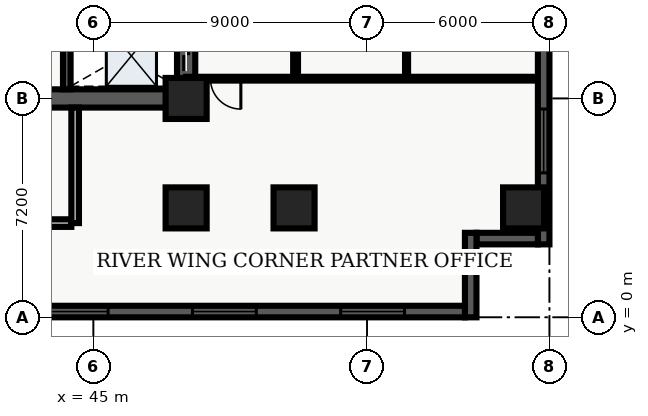
"""IFC4 building model, lengths in metres.
Left out: names, types, materials, properties, quantities, classifications, styles, units other than length and angle.
Written with IfcOpenShell. Run it as: python <this file> out.ifc"""

import sys

from ifc_helpers import new_model, entity, si_unit, converted_unit, direction, frame, origin_with_axes, origin_2d_with_axis, place, context, subcontext, project, spatial, polyline, rectangle, outline, extrude, element, fill, save


model = new_model("IFC4")
c1 = context("Model", 3, precision=1e-05, world=origin_with_axes(), true_north=direction((0.0, 1.0)))
c2 = subcontext(c1, "Body", "Model", "MODEL_VIEW")
j1 = project(units=[si_unit("LENGTHUNIT", "METRE"), converted_unit("PLANEANGLEUNIT", "DEGREE", entity("IfcPlaneAngleMeasure", 0.017), si_unit("PLANEANGLEUNIT", "RADIAN"), dimensions=[0, 0, 0, 0, 0, 0, 0])], contexts=[c1])
p1 = place(None, origin_with_axes())
s1 = spatial("IfcSite", under=j1, at=p1, CompositionType="ELEMENT")
p2 = place(p1, origin_with_axes())
s2 = spatial("IfcBuilding", under=s1, at=p2, CompositionType="ELEMENT")
p3 = place(p2, frame((0.0, 0.0, 48.3), z_axis=(0.0, 0.0, 1.0), x_axis=(1.0, 0.0, 0.0)))
s3 = spatial("IfcBuildingStorey", under=s2, at=p3, CompositionType="ELEMENT", Elevation=48.3)
p4 = place(p3, frame((40.2, 7.2, 0.0), z_axis=(0.0, 0.0, 1.0), x_axis=(1.0, 0.0, 0.0)))
e1 = element("IfcWall", 1, at=p4, inside=s3, PredefinedType="SHEAR", context=c2, shape_type="SweptSolid", body=[
    extrude(outline(polyline([(0.0, -0.3), (7.85, -0.3), (7.85, 0.3), (0.0, 0.3), (0.0, -0.3)])), origin_with_axes(), (0.0, 0.0, 1.0), 3.66),
])
p5 = place(p4, frame((2.175, 0.0, 0.0), z_axis=(0.0, 0.0, 1.0), x_axis=(1.0, 0.0, 0.0)))
e2 = element("IfcOpeningElement", 2, at=p5, cuts=e1, PredefinedType="OPENING", context=c2, shape_type="SweptSolid", body=[
    extrude(rectangle(XDim=1.05, YDim=0.62, at=origin_2d_with_axis()), origin_with_axes(), (0.0, 0.0, 1.0), 2.15),
])
p6 = place(p3, frame((48.05, 7.2, 0.0), z_axis=(0.0, 0.0, 1.0), x_axis=(0.0, 1.0, 0.0)))
e3 = element("IfcWall", 3, at=p6, inside=s3, PredefinedType="SHEAR", context=c2, shape_type="SweptSolid", body=[
    extrude(outline(polyline([(0.0, -0.3), (15.6, -0.3), (15.6, 0.3), (0.0, 0.3), (0.0, -0.3)])), origin_with_axes(), (0.0, 0.0, 1.0), 3.66),
])
p7 = place(p6, frame((1.425, 0.0, 0.0), z_axis=(0.0, 0.0, 1.0), x_axis=(1.0, 0.0, 0.0)))
e4 = element("IfcOpeningElement", 4, at=p7, cuts=e3, PredefinedType="OPENING", context=c2, shape_type="SweptSolid", body=[
    extrude(rectangle(XDim=1.05, YDim=0.62, at=origin_2d_with_axis()), origin_with_axes(), (0.0, 0.0, 1.0), 2.15),
])
p8 = place(p6, frame((3.475, 0.0, 0.0), z_axis=(0.0, 0.0, 1.0), x_axis=(1.0, 0.0, 0.0)))
e5 = element("IfcOpeningElement", 5, at=p8, cuts=e3, PredefinedType="OPENING", context=c2, shape_type="SweptSolid", body=[
    extrude(rectangle(XDim=1.05, YDim=0.62, at=origin_2d_with_axis()), origin_with_axes(), (0.0, 0.0, 1.0), 2.15),
])
p9 = place(p6, frame((5.625, 0.0, 0.0), z_axis=(0.0, 0.0, 1.0), x_axis=(1.0, 0.0, 0.0)))
e6 = element("IfcOpeningElement", 6, at=p9, cuts=e3, PredefinedType="OPENING", context=c2, shape_type="SweptSolid", body=[
    extrude(rectangle(XDim=0.95, YDim=0.62, at=origin_2d_with_axis()), origin_with_axes(), (0.0, 0.0, 1.0), 2.15),
])
p10 = place(p3, frame((44.125, 7.5, 0.0), z_axis=(0.0, 0.0, 1.0), x_axis=(0.0, 1.0, 0.0)))
e7 = element("IfcWall", 7, at=p10, inside=s3, PredefinedType="SHEAR", context=c2, shape_type="SweptSolid", body=[
    extrude(outline(polyline([(0.0, -0.125), (15.0, -0.125), (15.0, 0.125), (0.0, 0.125), (0.0, -0.125)])), origin_with_axes(), (0.0, 0.0, 1.0), 3.66),
])
p11 = place(p3, frame((40.325, 3.1, 0.0), z_axis=(0.0, 0.0, 1.0), x_axis=(1.0, 0.0, 0.0)))
e8 = element("IfcWall", 8, at=p11, inside=s3, PredefinedType="SOLIDWALL", context=c2, shape_type="SweptSolid", body=[
    extrude(outline(polyline([(0.0, -0.125), (3.95, -0.125), (3.95, 0.125), (0.0, 0.125), (0.0, -0.125)])), origin_with_axes(), (0.0, 0.0, 1.0), 2.7),
])
p12 = place(p3, frame((44.4, 3.1, 0.0), z_axis=(0.0, 0.0, 1.0), x_axis=(0.0, 1.0, 0.0)))
e9 = element("IfcWall", 9, at=p12, inside=s3, PredefinedType="SOLIDWALL", context=c2, shape_type="SweptSolid", body=[
    extrude(outline(polyline([(0.0, -0.125), (3.8, -0.125), (3.8, 0.125), (0.0, 0.125), (0.0, -0.125)])), origin_with_axes(), (0.0, 0.0, 1.0), 2.7),
])
for number, where, z_axis, x_axis in (
    (10, (48.05, 3.6, 0.0), (0.0, 0.0, 1.0), (1.0, 0.0, 0.0)),
    (11, (48.05, 7.2, 0.0), (0.0, 0.0, 1.0), (1.0, 0.0, 0.0)),
    (12, (51.6, 3.6, 0.0), (0.0, 0.0, 1.0), (1.0, 0.0, 0.0)),
    (13, (59.15, 3.6, 0.0), (0.0, 0.0, 1.0), (1.0, 0.0, 0.0)),
):
    element("IfcColumn", number, at=place(p3, frame(where, z_axis=z_axis, x_axis=x_axis)), inside=s3, PredefinedType="COLUMN", context=c2, shape_type="SweptSolid", body=[
        extrude(rectangle(XDim=1.35, YDim=1.35, at=origin_2d_with_axis()), origin_with_axes(), (0.0, 0.0, 1.0), 3.9),
    ])
p13 = place(p3, frame((51.65, 7.85, 0.0), z_axis=(0.0, 0.0, 1.0), x_axis=(0.0, 1.0, 0.0)))
e14 = element("IfcWall", 14, at=p13, inside=s3, PredefinedType="PARTITIONING", context=c2, shape_type="SweptSolid", body=[
    extrude(outline(polyline([(0.0, -0.08), (18.8, -0.08), (18.8, 0.08), (0.0, 0.08), (0.0, -0.08)])), origin_with_axes(), (0.0, 0.0, 1.0), 2.7),
])
p14 = place(p13, frame((4.453, 0.0, 0.0), z_axis=(0.0, 0.0, 1.0), x_axis=(1.0, 0.0, 0.0)))
e15 = element("IfcOpeningElement", 15, at=p14, cuts=e14, PredefinedType="OPENING", context=c2, shape_type="SweptSolid", body=[
    extrude(rectangle(XDim=1.0, YDim=0.18, at=origin_2d_with_axis()), origin_with_axes(), (0.0, 0.0, 1.0), 2.15),
])
p15 = place(p13, frame((7.831, 0.0, 0.0), z_axis=(0.0, 0.0, 1.0), x_axis=(1.0, 0.0, 0.0)))
e16 = element("IfcOpeningElement", 16, at=p15, cuts=e14, PredefinedType="OPENING", context=c2, shape_type="SweptSolid", body=[
    extrude(rectangle(XDim=1.0, YDim=0.18, at=origin_2d_with_axis()), origin_with_axes(), (0.0, 0.0, 1.0), 2.15),
])
p16 = place(p13, frame((11.898, 0.0, 0.0), z_axis=(0.0, 0.0, 1.0), x_axis=(1.0, 0.0, 0.0)))
e17 = element("IfcOpeningElement", 17, at=p16, cuts=e14, PredefinedType="OPENING", context=c2, shape_type="SweptSolid", body=[
    extrude(rectangle(XDim=1.0, YDim=0.18, at=origin_2d_with_axis()), origin_with_axes(), (0.0, 0.0, 1.0), 2.15),
])
p17 = place(p13, frame((17.98, 0.0, 0.0), z_axis=(0.0, 0.0, 1.0), x_axis=(1.0, 0.0, 0.0)))
e18 = element("IfcOpeningElement", 18, at=p17, cuts=e14, PredefinedType="OPENING", context=c2, shape_type="SweptSolid", body=[
    extrude(rectangle(XDim=1.0, YDim=0.18, at=origin_2d_with_axis()), origin_with_axes(), (0.0, 0.0, 1.0), 2.15),
])
p18 = place(p3, frame((59.64, 7.85, 0.0), z_axis=(0.0, 0.0, 1.0), x_axis=(-1.0, 0.0, 0.0)))
e19 = element("IfcWall", 19, at=p18, inside=s3, PredefinedType="PARTITIONING", context=c2, shape_type="SweptSolid", body=[
    extrude(outline(polyline([(0.0, -0.062), (11.59, -0.062), (11.59, 0.062), (0.0, 0.062), (0.0, -0.062)])), origin_with_axes(), (0.0, 0.0, 1.0), 2.7),
])
p19 = place(p18, frame((10.29, 0.0, 0.0), z_axis=(0.0, 0.0, 1.0), x_axis=(1.0, 0.0, 0.0)))
e20 = element("IfcOpeningElement", 20, at=p19, cuts=e19, PredefinedType="OPENING", context=c2, shape_type="SweptSolid", body=[
    extrude(rectangle(XDim=1.0, YDim=0.145, at=origin_2d_with_axis()), origin_with_axes(), (0.0, 0.0, 1.0), 2.15),
])
p20 = place(p3, frame((55.3, 7.98, 0.0), z_axis=(0.0, 0.0, 1.0), x_axis=(0.0, 1.0, 0.0)))
e21 = element("IfcWall", 21, at=p20, inside=s3, PredefinedType="PARTITIONING", context=c2, shape_type="SweptSolid", body=[
    extrude(outline(polyline([(0.0, -0.05), (18.54, -0.05), (18.54, 0.05), (0.0, 0.05), (0.0, -0.05)])), origin_with_axes(), (0.0, 0.0, 1.0), 2.7),
])
p21 = place(p20, frame((3.073, 0.0, 0.0), z_axis=(0.0, 0.0, 1.0), x_axis=(1.0, 0.0, 0.0)))
e22 = element("IfcOpeningElement", 22, at=p21, cuts=e21, PredefinedType="OPENING", context=c2, shape_type="SweptSolid", body=[
    extrude(rectangle(XDim=0.95, YDim=0.12, at=origin_2d_with_axis()), origin_with_axes(), (0.0, 0.0, 1.0), 2.15),
])
p22 = place(p20, frame((7.981, 0.0, 0.0), z_axis=(0.0, 0.0, 1.0), x_axis=(1.0, 0.0, 0.0)))
e23 = element("IfcOpeningElement", 23, at=p22, cuts=e21, PredefinedType="OPENING", context=c2, shape_type="SweptSolid", body=[
    extrude(rectangle(XDim=0.95, YDim=0.12, at=origin_2d_with_axis()), origin_with_axes(), (0.0, 0.0, 1.0), 2.15),
])
p23 = place(p20, frame((11.768, 0.0, 0.0), z_axis=(0.0, 0.0, 1.0), x_axis=(1.0, 0.0, 0.0)))
e24 = element("IfcOpeningElement", 24, at=p23, cuts=e21, PredefinedType="OPENING", context=c2, shape_type="SweptSolid", body=[
    extrude(rectangle(XDim=0.95, YDim=0.12, at=origin_2d_with_axis()), origin_with_axes(), (0.0, 0.0, 1.0), 2.15),
])
p24 = place(p20, frame((16.201, 0.0, 0.0), z_axis=(0.0, 0.0, 1.0), x_axis=(1.0, 0.0, 0.0)))
e25 = element("IfcOpeningElement", 25, at=p24, cuts=e21, PredefinedType="OPENING", context=c2, shape_type="SweptSolid", body=[
    extrude(rectangle(XDim=0.95, YDim=0.12, at=origin_2d_with_axis()), origin_with_axes(), (0.0, 0.0, 1.0), 2.15),
])
p25 = place(p3, frame((59.81, 26.02, 0.0), z_axis=(0.0, 0.0, 1.0), x_axis=(0.0, -1.0, 0.0)))
e26 = element("IfcWall", 26, at=p25, inside=s3, PredefinedType="SOLIDWALL", context=c2, shape_type="SweptSolid", body=[
    extrude(outline(polyline([(0.0, -0.19), (23.62, -0.19), (23.62, 0.19), (0.0, 0.19), (0.0, -0.19)])), origin_with_axes(), (0.0, 0.0, 1.0), 3.66),
])
p26 = place(p25, frame((20.218, 0.0, 0.45), z_axis=(0.0, 0.0, 1.0), x_axis=(1.0, 0.0, 0.0)))
e27 = element("IfcOpeningElement", 27, at=p26, cuts=e26, PredefinedType="OPENING", context=c2, shape_type="SweptSolid", body=[
    extrude(rectangle(XDim=2.1, YDim=0.4, at=origin_2d_with_axis()), origin_with_axes(), (0.0, 0.0, 1.0), 2.2),
])
p27 = place(p3, frame((59.62, 2.59, 0.0), z_axis=(0.0, 0.0, 1.0), x_axis=(-1.0, 0.0, 0.0)))
e28 = element("IfcWall", 28, at=p27, inside=s3, PredefinedType="SOLIDWALL", context=c2, shape_type="SweptSolid", body=[
    extrude(outline(polyline([(0.0, -0.19), (2.02, -0.19), (2.02, 0.19), (0.0, 0.19), (0.0, -0.19)])), origin_with_axes(), (0.0, 0.0, 1.0), 3.66),
])
p28 = place(p3, frame((57.41, 2.78, 0.0), z_axis=(0.0, 0.0, 1.0), x_axis=(0.0, -1.0, 0.0)))
e29 = element("IfcWall", 29, at=p28, inside=s3, PredefinedType="SOLIDWALL", context=c2, shape_type="SweptSolid", body=[
    extrude(outline(polyline([(0.0, -0.19), (2.78, -0.19), (2.78, 0.19), (0.0, 0.19), (0.0, -0.19)])), origin_with_axes(), (0.0, 0.0, 1.0), 3.66),
])
p29 = place(p3, frame((57.22, 0.19, 0.0), z_axis=(0.0, 0.0, 1.0), x_axis=(-1.0, 0.0, 0.0)))
e30 = element("IfcWall", 30, at=p29, inside=s3, PredefinedType="SOLIDWALL", context=c2, shape_type="SweptSolid", body=[
    extrude(outline(polyline([(0.0, -0.19), (54.82, -0.19), (54.82, 0.19), (0.0, 0.19), (0.0, -0.19)])), origin_with_axes(), (0.0, 0.0, 1.0), 3.66),
])
p30 = place(p29, frame((3.037, 0.0, 0.45), z_axis=(0.0, 0.0, 1.0), x_axis=(1.0, 0.0, 0.0)))
e31 = element("IfcOpeningElement", 31, at=p30, cuts=e30, PredefinedType="OPENING", context=c2, shape_type="SweptSolid", body=[
    extrude(rectangle(XDim=2.1, YDim=0.4, at=origin_2d_with_axis()), origin_with_axes(), (0.0, 0.0, 1.0), 2.2),
])
p31 = place(p29, frame((7.912, 0.0, 0.45), z_axis=(0.0, 0.0, 1.0), x_axis=(1.0, 0.0, 0.0)))
e32 = element("IfcOpeningElement", 32, at=p31, cuts=e30, PredefinedType="OPENING", context=c2, shape_type="SweptSolid", body=[
    extrude(rectangle(XDim=2.1, YDim=0.4, at=origin_2d_with_axis()), origin_with_axes(), (0.0, 0.0, 1.0), 2.2),
])
p32 = place(p29, frame((12.786, 0.0, 0.45), z_axis=(0.0, 0.0, 1.0), x_axis=(1.0, 0.0, 0.0)))
e33 = element("IfcOpeningElement", 33, at=p32, cuts=e30, PredefinedType="OPENING", context=c2, shape_type="SweptSolid", body=[
    extrude(rectangle(XDim=2.1, YDim=0.4, at=origin_2d_with_axis()), origin_with_axes(), (0.0, 0.0, 1.0), 2.2),
])
p33 = place(p29, frame((17.661, 0.0, 0.45), z_axis=(0.0, 0.0, 1.0), x_axis=(1.0, 0.0, 0.0)))
e34 = element("IfcOpeningElement", 34, at=p33, cuts=e30, PredefinedType="OPENING", context=c2, shape_type="SweptSolid", body=[
    extrude(rectangle(XDim=2.1, YDim=0.4, at=origin_2d_with_axis()), origin_with_axes(), (0.0, 0.0, 1.0), 2.2),
])
p34 = place(p29, frame((22.535, 0.0, 0.45), z_axis=(0.0, 0.0, 1.0), x_axis=(1.0, 0.0, 0.0)))
e35 = element("IfcOpeningElement", 35, at=p34, cuts=e30, PredefinedType="OPENING", context=c2, shape_type="SweptSolid", body=[
    extrude(rectangle(XDim=2.1, YDim=0.4, at=origin_2d_with_axis()), origin_with_axes(), (0.0, 0.0, 1.0), 2.2),
])
p35 = place(p29, frame((27.41, 0.0, 0.45), z_axis=(0.0, 0.0, 1.0), x_axis=(1.0, 0.0, 0.0)))
e36 = element("IfcOpeningElement", 36, at=p35, cuts=e30, PredefinedType="OPENING", context=c2, shape_type="SweptSolid", body=[
    extrude(rectangle(XDim=2.1, YDim=0.4, at=origin_2d_with_axis()), origin_with_axes(), (0.0, 0.0, 1.0), 2.2),
])
p36 = place(p29, frame((32.285, 0.0, 0.45), z_axis=(0.0, 0.0, 1.0), x_axis=(1.0, 0.0, 0.0)))
e37 = element("IfcOpeningElement", 37, at=p36, cuts=e30, PredefinedType="OPENING", context=c2, shape_type="SweptSolid", body=[
    extrude(rectangle(XDim=2.1, YDim=0.4, at=origin_2d_with_axis()), origin_with_axes(), (0.0, 0.0, 1.0), 2.2),
])
p37 = place(p29, frame((37.159, 0.0, 0.45), z_axis=(0.0, 0.0, 1.0), x_axis=(1.0, 0.0, 0.0)))
e38 = element("IfcOpeningElement", 38, at=p37, cuts=e30, PredefinedType="OPENING", context=c2, shape_type="SweptSolid", body=[
    extrude(rectangle(XDim=2.1, YDim=0.4, at=origin_2d_with_axis()), origin_with_axes(), (0.0, 0.0, 1.0), 2.2),
])
p38 = place(p29, frame((41.584, 0.0, 0.45), z_axis=(0.0, 0.0, 1.0), x_axis=(1.0, 0.0, 0.0)))
e39 = element("IfcOpeningElement", 39, at=p38, cuts=e30, PredefinedType="OPENING", context=c2, shape_type="SweptSolid", body=[
    extrude(rectangle(XDim=2.1, YDim=0.4, at=origin_2d_with_axis()), origin_with_axes(), (0.0, 0.0, 1.0), 2.2),
])
p39 = place(p29, frame((46.908, 0.0, 0.45), z_axis=(0.0, 0.0, 1.0), x_axis=(1.0, 0.0, 0.0)))
e40 = element("IfcOpeningElement", 40, at=p39, cuts=e30, PredefinedType="OPENING", context=c2, shape_type="SweptSolid", body=[
    extrude(rectangle(XDim=2.1, YDim=0.4, at=origin_2d_with_axis()), origin_with_axes(), (0.0, 0.0, 1.0), 2.2),
])
p40 = place(p29, frame((51.783, 0.0, 0.45), z_axis=(0.0, 0.0, 1.0), x_axis=(1.0, 0.0, 0.0)))
e41 = element("IfcOpeningElement", 41, at=p40, cuts=e30, PredefinedType="OPENING", context=c2, shape_type="SweptSolid", body=[
    extrude(rectangle(XDim=2.1, YDim=0.4, at=origin_2d_with_axis()), origin_with_axes(), (0.0, 0.0, 1.0), 2.2),
])
p41 = place(p6, frame((1.425, 0.0, 0.0), z_axis=(0.0, 0.0, 1.0), x_axis=(1.0, 0.0, 0.0)))
e42 = element("IfcDoor", 42, at=p41, inside=s3, OperationType="SLIDING_TO_LEFT", PredefinedType="DOOR", context=c2, shape_type="SweptSolid", body=[
    extrude(rectangle(XDim=1.05, YDim=0.09, at=origin_2d_with_axis()), origin_with_axes(), (0.0, 0.0, 1.0), 2.15),
])
fill(e4, e42)
p42 = place(p18, frame((10.29, 0.0, 0.0), z_axis=(0.0, 0.0, 1.0), x_axis=(1.0, 0.0, 0.0)))
e43 = element("IfcDoor", 43, at=p42, inside=s3, OperationType="SINGLE_SWING_LEFT", PredefinedType="DOOR", context=c2, shape_type="SweptSolid", body=[
    extrude(rectangle(XDim=1.0, YDim=0.075, at=origin_2d_with_axis()), origin_with_axes(), (0.0, 0.0, 1.0), 2.15),
])
fill(e20, e43)
p43 = place(p25, frame((20.218, 0.0, 0.45), z_axis=(0.0, 0.0, 1.0), x_axis=(1.0, 0.0, 0.0)))
e44 = element("IfcWindow", 44, at=p43, inside=s3, PredefinedType="WINDOW", context=c2, shape_type="SweptSolid", body=[
    extrude(rectangle(XDim=2.1, YDim=0.09, at=origin_2d_with_axis()), origin_with_axes(), (0.0, 0.0, 1.0), 2.2),
])
fill(e27, e44)
p44 = place(p29, frame((3.037, 0.0, 0.45), z_axis=(0.0, 0.0, 1.0), x_axis=(1.0, 0.0, 0.0)))
e45 = element("IfcWindow", 45, at=p44, inside=s3, PredefinedType="WINDOW", context=c2, shape_type="SweptSolid", body=[
    extrude(rectangle(XDim=2.1, YDim=0.09, at=origin_2d_with_axis()), origin_with_axes(), (0.0, 0.0, 1.0), 2.2),
])
fill(e31, e45)
p45 = place(p29, frame((7.912, 0.0, 0.45), z_axis=(0.0, 0.0, 1.0), x_axis=(1.0, 0.0, 0.0)))
e46 = element("IfcWindow", 46, at=p45, inside=s3, PredefinedType="WINDOW", context=c2, shape_type="SweptSolid", body=[
    extrude(rectangle(XDim=2.1, YDim=0.09, at=origin_2d_with_axis()), origin_with_axes(), (0.0, 0.0, 1.0), 2.2),
])
fill(e32, e46)
p46 = place(p29, frame((12.786, 0.0, 0.45), z_axis=(0.0, 0.0, 1.0), x_axis=(1.0, 0.0, 0.0)))
e47 = element("IfcWindow", 47, at=p46, inside=s3, PredefinedType="WINDOW", context=c2, shape_type="SweptSolid", body=[
    extrude(rectangle(XDim=2.1, YDim=0.09, at=origin_2d_with_axis()), origin_with_axes(), (0.0, 0.0, 1.0), 2.2),
])
fill(e33, e47)
save(model, sys.argv[1])
